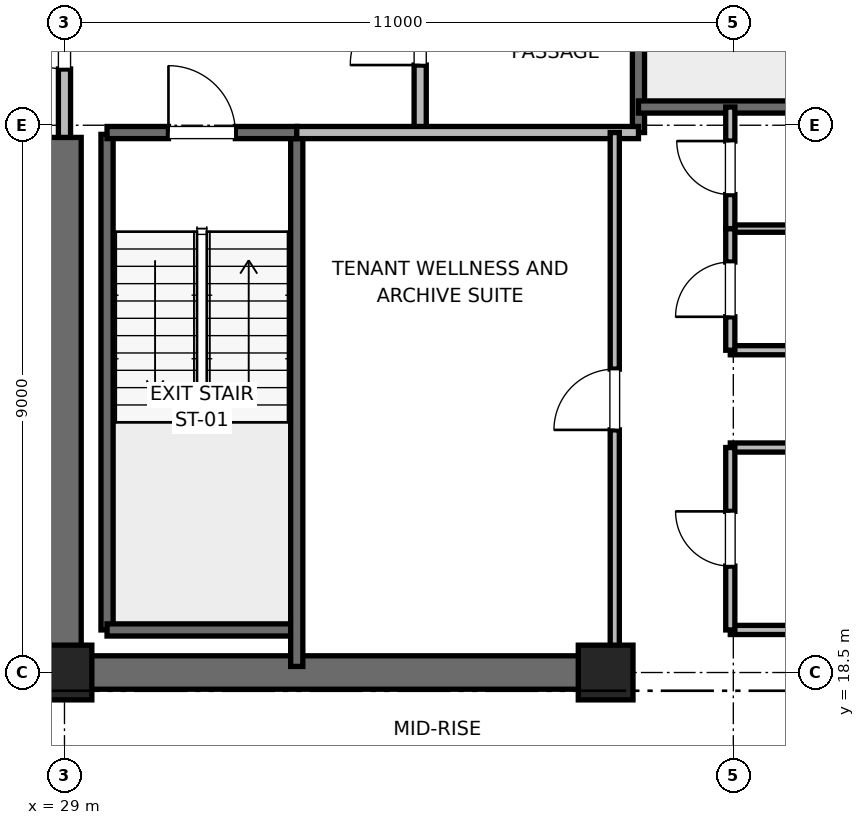
"""IFC4 building model, lengths in metres.
Left out: names, types, materials, properties, quantities, classifications, styles, units other than length and angle.
Written with IfcOpenShell. Run it as: python <this file> out.ifc"""

import sys

from ifc_helpers import new_model, si_unit, direction, frame, frame_2d, origin, origin_2d, place, context, subcontext, project, spatial, rectangle, extrude, element, fill, save


model = new_model("IFC4")
c1 = context("Model", 3, precision=1e-05, world=origin(), true_north=direction((0.0, 1.0)))
c2 = subcontext(c1, "Body", "Model", "MODEL_VIEW")
j1 = project(units=[si_unit("LENGTHUNIT", "METRE"), si_unit("PLANEANGLEUNIT", "RADIAN")], contexts=[c1])
p1 = place(None, origin())
s1 = spatial("IfcSite", under=j1, at=p1, CompositionType="ELEMENT")
p2 = place(p1, origin())
s2 = spatial("IfcBuilding", under=s1, at=p2, CompositionType="ELEMENT")
p3 = place(p2, frame((0.0, 0.0, 225.2)))
s3 = spatial("IfcBuildingStorey", under=s2, at=p3, CompositionType="ELEMENT", Elevation=225.2)
for number, where, z_axis, x_axis in (
    (1, (29.0, 18.5, 0.0), (0.0, 0.0, 1.0), (1.0, 0.0, 0.0)),
    (2, (37.9, 18.5, 0.0), (0.0, 0.0, 1.0), (1.0, 0.0, 0.0)),
):
    element("IfcColumn", number, at=place(p3, frame(where, z_axis=z_axis, x_axis=x_axis)), inside=s3, PredefinedType="PILASTER", context=c2, shape_type="SweptSolid", body=[
        extrude(rectangle(XDim=0.9, YDim=0.9, at=origin_2d()), origin(), (0.0, 0.0, 1.0), 4.0),
    ])
p4 = place(p3, frame((29.0, 18.5, 0.0), z_axis=(0.0, 0.0, 1.0), x_axis=(1.0, 0.0, 0.0)))
e3 = element("IfcWall", 3, at=p4, inside=s3, PredefinedType="SHEAR", context=c2, shape_type="SweptSolid", body=[
    extrude(rectangle(XDim=9.2, YDim=0.55, at=frame_2d((4.6, 0.0))), origin(), (0.0, 0.0, 1.0), 3.775),
])
p5 = place(p3, frame((29.0, 18.5, 0.0), z_axis=(0.0, 0.0, 1.0), x_axis=(0.0, 1.0, 0.0)))
e4 = element("IfcWall", 4, at=p5, inside=s3, PredefinedType="SHEAR", context=c2, shape_type="SweptSolid", body=[
    extrude(rectangle(XDim=8.8, YDim=0.55, at=frame_2d((4.4, 0.0))), origin(), (0.0, 0.0, 1.0), 3.775),
])
p6 = place(p3, frame((29.7, 19.2, 0.0), z_axis=(0.0, 0.0, 1.0), x_axis=(0.0, 1.0, 0.0)))
e5 = element("IfcWall", 5, at=p6, inside=s3, PredefinedType="SOLIDWALL", context=c2, shape_type="SweptSolid", body=[
    extrude(rectangle(XDim=8.15, YDim=0.2, at=frame_2d((4.075, 0.0))), origin(), (0.0, 0.0, 1.0), 3.775),
])
p7 = place(p3, frame((29.7, 19.2, 0.0), z_axis=(0.0, 0.0, 1.0), x_axis=(1.0, 0.0, 0.0)))
e6 = element("IfcWall", 6, at=p7, inside=s3, PredefinedType="SOLIDWALL", context=c2, shape_type="SweptSolid", body=[
    extrude(rectangle(XDim=3.12, YDim=0.2, at=frame_2d((1.56, 0.0))), origin(), (0.0, 0.0, 1.0), 3.775),
])
p8 = place(p3, frame((32.82, 18.6, 0.0), z_axis=(0.0, 0.0, 1.0), x_axis=(0.0, 1.0, 0.0)))
e7 = element("IfcWall", 7, at=p8, inside=s3, PredefinedType="SOLIDWALL", context=c2, shape_type="SweptSolid", body=[
    extrude(rectangle(XDim=8.78, YDim=0.2, at=frame_2d((4.39, 0.0))), origin(), (0.0, 0.0, 1.0), 3.775),
])
p9 = place(p3, frame((29.7, 27.38, 0.0), z_axis=(0.0, 0.0, 1.0), x_axis=(1.0, 0.0, 0.0)))
e8 = element("IfcWall", 8, at=p9, inside=s3, PredefinedType="SOLIDWALL", context=c2, shape_type="SweptSolid", body=[
    extrude(rectangle(XDim=3.12, YDim=0.2, at=frame_2d((1.56, 0.0))), origin(), (0.0, 0.0, 1.0), 3.775),
])
p10 = place(p9, frame((1.01, 0.0, 0.0)))
e9 = element("IfcOpeningElement", 9, at=p10, cuts=e8, PredefinedType="OPENING", context=c2, shape_type="SweptSolid", body=[
    extrude(rectangle(XDim=1.1, YDim=2.15, at=frame_2d((0.55, 1.075))), frame((0.0, 0.1, 0.0), z_axis=(0.0, -1.0, 0.0), x_axis=(1.0, 0.0, 0.0)), (0.0, 0.0, 1.0), 0.2),
])
p11 = place(p3, frame((38.44, 27.38, 0.0), z_axis=(0.0, 0.0, 1.0), x_axis=(0.0, 1.0, 0.0)))
e10 = element("IfcWall", 10, at=p11, inside=s3, PredefinedType="SOLIDWALL", context=c2, shape_type="SweptSolid", body=[
    extrude(rectangle(XDim=8.87, YDim=0.2, at=frame_2d((4.435, 0.0))), origin(), (0.0, 0.0, 1.0), 3.775),
])
p12 = place(p3, frame((38.44, 27.8, 0.0), z_axis=(0.0, 0.0, 1.0), x_axis=(1.0, 0.0, 0.0)))
e11 = element("IfcWall", 11, at=p12, inside=s3, PredefinedType="SOLIDWALL", context=c2, shape_type="SweptSolid", body=[
    extrude(rectangle(XDim=3.32, YDim=0.2, at=frame_2d((1.66, 0.0))), origin(), (0.0, 0.0, 1.0), 3.775),
])
p13 = place(p3, frame((34.85, 27.38, 0.0), z_axis=(0.0, 0.0, 1.0), x_axis=(0.0, 1.0, 0.0)))
e12 = element("IfcWall", 12, at=p13, inside=s3, PredefinedType="PARTITIONING", context=c2, shape_type="SweptSolid", body=[
    extrude(rectangle(XDim=3.37, YDim=0.2, at=frame_2d((1.685, 0.0))), origin(), (0.0, 0.0, 1.0), 3.775),
])
p14 = place(p13, frame((1.11, 0.0, 0.0)))
e13 = element("IfcOpeningElement", 13, at=p14, cuts=e12, PredefinedType="OPENING", context=c2, shape_type="SweptSolid", body=[
    extrude(rectangle(XDim=1.15, YDim=2.2, at=frame_2d((0.575, 1.1))), frame((0.0, 0.1, 0.0), z_axis=(0.0, -1.0, 0.0), x_axis=(1.0, 0.0, 0.0)), (0.0, 0.0, 1.0), 0.2),
])
p15 = place(p3, frame((29.0, 27.3, 0.0), z_axis=(0.0, 0.0, 1.0), x_axis=(0.0, 1.0, 0.0)))
e14 = element("IfcWall", 14, at=p15, inside=s3, PredefinedType="PARTITIONING", context=c2, shape_type="SweptSolid", body=[
    extrude(rectangle(XDim=3.4, YDim=0.2, at=frame_2d((1.7, 0.0))), origin(), (0.0, 0.0, 1.0), 2.755),
])
p16 = place(p15, frame((1.125, 0.0, 0.0)))
e15 = element("IfcOpeningElement", 15, at=p16, cuts=e14, PredefinedType="OPENING", context=c2, shape_type="SweptSolid", body=[
    extrude(rectangle(XDim=1.15, YDim=2.2, at=frame_2d((0.575, 1.1))), frame((0.0, 0.1, 0.0), z_axis=(0.0, -1.0, 0.0), x_axis=(1.0, 0.0, 0.0)), (0.0, 0.0, 1.0), 0.2),
])
p17 = place(p3, frame((32.82, 27.38, 0.0), z_axis=(0.0, 0.0, 1.0), x_axis=(1.0, 0.0, 0.0)))
e16 = element("IfcWall", 16, at=p17, inside=s3, PredefinedType="PARTITIONING", context=c2, shape_type="SweptSolid", body=[
    extrude(rectangle(XDim=5.62, YDim=0.2, at=frame_2d((2.81, 0.0))), origin(), (0.0, 0.0, 1.0), 3.775),
])
for number, where, z_axis, x_axis in (
    (17, (39.95, 19.2, 0.0), (0.0, 0.0, 1.0), (1.0, 0.0, 0.0)),
    (18, (39.95, 22.2, 0.0), (0.0, 0.0, 1.0), (1.0, 0.0, 0.0)),
    (19, (39.95, 23.8, 0.0), (0.0, 0.0, 1.0), (1.0, 0.0, 0.0)),
):
    element("IfcWall", number, at=place(p3, frame(where, z_axis=z_axis, x_axis=x_axis)), inside=s3, PredefinedType="PARTITIONING", context=c2, shape_type="SweptSolid", body=[
        extrude(rectangle(XDim=1.81, YDim=0.15, at=frame_2d((0.905, 0.0))), origin(), (0.0, 0.0, 1.0), 2.85),
    ])
p18 = place(p3, frame((39.95, 25.8, 0.0), z_axis=(0.0, 0.0, 1.0), x_axis=(1.0, 0.0, 0.0)))
e20 = element("IfcWall", 20, at=p18, inside=s3, PredefinedType="PARTITIONING", context=c2, shape_type="SweptSolid", body=[
    extrude(rectangle(XDim=1.81, YDim=0.12, at=frame_2d((0.905, 0.0))), origin(), (0.0, 0.0, 1.0), 2.85),
])
p19 = place(p3, frame((39.95, 19.2, 0.0), z_axis=(0.0, 0.0, 1.0), x_axis=(0.0, 1.0, 0.0)))
e21 = element("IfcWall", 21, at=p19, inside=s3, PredefinedType="PARTITIONING", context=c2, shape_type="SweptSolid", body=[
    extrude(rectangle(XDim=3.0, YDim=0.15, at=frame_2d((1.5, 0.0))), origin(), (0.0, 0.0, 1.0), 2.85),
])
p20 = place(p19, frame((1.05, 0.0, 0.0)))
e22 = element("IfcOpeningElement", 22, at=p20, cuts=e21, PredefinedType="OPENING", context=c2, shape_type="SweptSolid", body=[
    extrude(rectangle(XDim=0.9, YDim=2.1, at=frame_2d((0.45, 1.05))), frame((0.0, 0.075, 0.0), z_axis=(0.0, -1.0, 0.0), x_axis=(1.0, 0.0, 0.0)), (0.0, 0.0, 1.0), 0.15),
])
p21 = place(p3, frame((39.95, 23.8, 0.0), z_axis=(0.0, 0.0, 1.0), x_axis=(0.0, 1.0, 0.0)))
e23 = element("IfcWall", 23, at=p21, inside=s3, PredefinedType="PARTITIONING", context=c2, shape_type="SweptSolid", body=[
    extrude(rectangle(XDim=2.0, YDim=0.15, at=frame_2d((1.0, 0.0))), origin(), (0.0, 0.0, 1.0), 2.85),
])
p22 = place(p21, frame((0.55, 0.0, 0.0)))
e24 = element("IfcOpeningElement", 24, at=p22, cuts=e23, PredefinedType="OPENING", context=c2, shape_type="SweptSolid", body=[
    extrude(rectangle(XDim=0.9, YDim=2.1, at=frame_2d((0.45, 1.05))), frame((0.0, 0.075, 0.0), z_axis=(0.0, -1.0, 0.0), x_axis=(1.0, 0.0, 0.0)), (0.0, 0.0, 1.0), 0.15),
])
p23 = place(p3, frame((39.95, 25.8, 0.0), z_axis=(0.0, 0.0, 1.0), x_axis=(0.0, 1.0, 0.0)))
e25 = element("IfcWall", 25, at=p23, inside=s3, PredefinedType="PARTITIONING", context=c2, shape_type="SweptSolid", body=[
    extrude(rectangle(XDim=2.0, YDim=0.15, at=frame_2d((1.0, 0.0))), origin(), (0.0, 0.0, 1.0), 2.85),
])
p24 = place(p23, frame((0.56, 0.0, 0.0)))
e26 = element("IfcOpeningElement", 26, at=p24, cuts=e25, PredefinedType="OPENING", context=c2, shape_type="SweptSolid", body=[
    extrude(rectangle(XDim=0.88, YDim=2.1, at=frame_2d((0.44, 1.05))), frame((0.0, 0.075, 0.0), z_axis=(0.0, -1.0, 0.0), x_axis=(1.0, 0.0, 0.0)), (0.0, 0.0, 1.0), 0.15),
])
p25 = place(p3, frame((38.05, 18.6, 0.0), z_axis=(0.0, 0.0, 1.0), x_axis=(0.0, 1.0, 0.0)))
e27 = element("IfcWall", 27, at=p25, inside=s3, PredefinedType="PARTITIONING", context=c2, shape_type="SweptSolid", body=[
    extrude(rectangle(XDim=8.78, YDim=0.15, at=frame_2d((4.39, 0.0))), origin(), (0.0, 0.0, 1.0), 2.755),
])
p26 = place(p25, frame((3.89, 0.0, 0.0)))
e28 = element("IfcOpeningElement", 28, at=p26, cuts=e27, PredefinedType="OPENING", context=c2, shape_type="SweptSolid", body=[
    extrude(rectangle(XDim=1.0, YDim=2.15, at=frame_2d((0.5, 1.075))), frame((0.0, 0.075, 0.0), z_axis=(0.0, -1.0, 0.0), x_axis=(1.0, 0.0, 0.0)), (0.0, 0.0, 1.0), 0.15),
])
p27 = place(p10, origin())
e29 = element("IfcDoor", 29, at=p27, inside=s3, OperationType="SINGLE_SWING_LEFT", PredefinedType="DOOR", context=c2, shape_type="SweptSolid", body=[
    extrude(rectangle(XDim=1.1, YDim=2.15, at=frame_2d((0.55, 1.075))), frame((0.0, 0.025, 0.0), z_axis=(0.0, -1.0, 0.0), x_axis=(1.0, 0.0, 0.0)), (0.0, 0.0, 1.0), 0.05),
])
fill(e9, e29)
p28 = place(p14, origin())
e30 = element("IfcDoor", 30, at=p28, inside=s3, OperationType="SINGLE_SWING_LEFT", PredefinedType="DOOR", context=c2, shape_type="SweptSolid", body=[
    extrude(rectangle(XDim=1.15, YDim=2.2, at=frame_2d((0.575, 1.1))), frame((0.0, 0.025, 0.0), z_axis=(0.0, -1.0, 0.0), x_axis=(1.0, 0.0, 0.0)), (0.0, 0.0, 1.0), 0.05),
])
fill(e13, e30)
p29 = place(p16, origin())
e31 = element("IfcDoor", 31, at=p29, inside=s3, OperationType="SINGLE_SWING_RIGHT", PredefinedType="DOOR", context=c2, shape_type="SweptSolid", body=[
    extrude(rectangle(XDim=1.15, YDim=2.2, at=frame_2d((0.575, 1.1))), frame((0.0, 0.025, 0.0), z_axis=(0.0, -1.0, 0.0), x_axis=(1.0, 0.0, 0.0)), (0.0, 0.0, 1.0), 0.05),
])
fill(e15, e31)
p30 = place(p20, origin())
e32 = element("IfcDoor", 32, at=p30, inside=s3, OperationType="SINGLE_SWING_RIGHT", PredefinedType="DOOR", context=c2, shape_type="SweptSolid", body=[
    extrude(rectangle(XDim=0.9, YDim=2.1, at=frame_2d((0.45, 1.05))), frame((0.0, 0.025, 0.0), z_axis=(0.0, -1.0, 0.0), x_axis=(1.0, 0.0, 0.0)), (0.0, 0.0, 1.0), 0.05),
])
fill(e22, e32)
p31 = place(p22, origin())
e33 = element("IfcDoor", 33, at=p31, inside=s3, OperationType="SINGLE_SWING_LEFT", PredefinedType="DOOR", context=c2, shape_type="SweptSolid", body=[
    extrude(rectangle(XDim=0.9, YDim=2.1, at=frame_2d((0.45, 1.05))), frame((0.0, 0.025, 0.0), z_axis=(0.0, -1.0, 0.0), x_axis=(1.0, 0.0, 0.0)), (0.0, 0.0, 1.0), 0.05),
])
fill(e24, e33)
p32 = place(p24, origin())
e34 = element("IfcDoor", 34, at=p32, inside=s3, OperationType="SINGLE_SWING_RIGHT", PredefinedType="DOOR", context=c2, shape_type="SweptSolid", body=[
    extrude(rectangle(XDim=0.88, YDim=2.1, at=frame_2d((0.44, 1.05))), frame((0.0, 0.025, 0.0), z_axis=(0.0, -1.0, 0.0), x_axis=(1.0, 0.0, 0.0)), (0.0, 0.0, 1.0), 0.05),
])
fill(e26, e34)
p33 = place(p26, origin())
e35 = element("IfcDoor", 35, at=p33, inside=s3, OperationType="SINGLE_SWING_LEFT", PredefinedType="DOOR", context=c2, shape_type="SweptSolid", body=[
    extrude(rectangle(XDim=1.0, YDim=2.15, at=frame_2d((0.5, 1.075))), frame((0.0, 0.025, 0.0), z_axis=(0.0, -1.0, 0.0), x_axis=(1.0, 0.0, 0.0)), (0.0, 0.0, 1.0), 0.05),
])
fill(e28, e35)
save(model, sys.argv[1])
